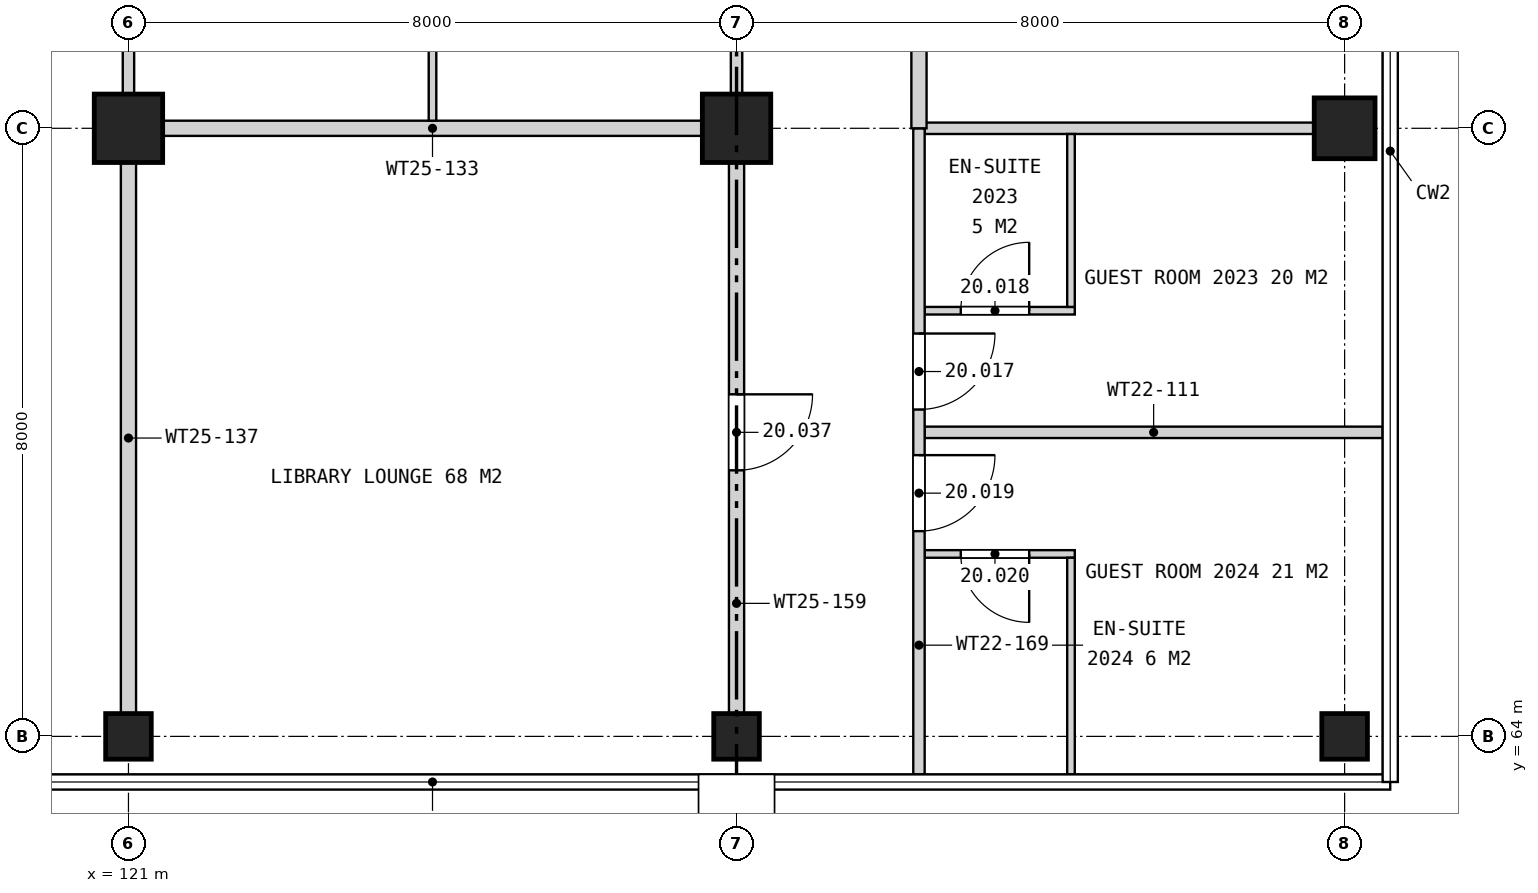
"""IFC4 building model, lengths in metres.
Left out: names, types, materials, properties, quantities, classifications, styles, units other than length and angle.
Written with IfcOpenShell. Run it as: python <this file> out.ifc"""

import sys

from ifc_helpers import new_model, si_unit, direction, frame, frame_2d, origin, origin_2d, place, context, subcontext, project, spatial, rectangle, extrude, element, fill, save


model = new_model("IFC4")
c1 = context("Model", 3, precision=1e-05, world=origin(), true_north=direction((0.0, 1.0)))
c2 = subcontext(c1, "Body", "Model", "MODEL_VIEW")
j1 = project(units=[si_unit("LENGTHUNIT", "METRE"), si_unit("PLANEANGLEUNIT", "RADIAN")], contexts=[c1])
p1 = place(None, origin())
s1 = spatial("IfcSite", under=j1, at=p1, CompositionType="ELEMENT")
p2 = place(p1, origin())
s2 = spatial("IfcBuilding", under=s1, at=p2, CompositionType="ELEMENT")
p3 = place(p2, frame((0.0, 0.0, 101.6)))
s3 = spatial("IfcBuildingStorey", under=s2, at=p3, CompositionType="ELEMENT", Elevation=101.6)
p4 = place(p3, frame((121.0, 64.0, 0.0), z_axis=(0.0, 0.0, 1.0), x_axis=(1.0, 0.0, 0.0)))
e1 = element("IfcColumn", 1, at=p4, inside=s3, PredefinedType="COLUMN", context=c2, shape_type="SweptSolid", body=[
    extrude(rectangle(XDim=0.6, YDim=0.6, at=origin_2d()), origin(), (0.0, 0.0, 1.0), 3.7),
])
p5 = place(p3, frame((121.0, 72.0, 0.0), z_axis=(0.0, 0.0, 1.0), x_axis=(1.0, 0.0, 0.0)))
e2 = element("IfcColumn", 2, at=p5, inside=s3, PredefinedType="COLUMN", context=c2, shape_type="SweptSolid", body=[
    extrude(rectangle(XDim=0.9, YDim=0.9, at=origin_2d()), origin(), (0.0, 0.0, 1.0), 3.7),
])
p6 = place(p3, frame((129.0, 64.0, 0.0), z_axis=(0.0, 0.0, 1.0), x_axis=(1.0, 0.0, 0.0)))
e3 = element("IfcColumn", 3, at=p6, inside=s3, PredefinedType="COLUMN", context=c2, shape_type="SweptSolid", body=[
    extrude(rectangle(XDim=0.6, YDim=0.6, at=origin_2d()), origin(), (0.0, 0.0, 1.0), 3.7),
])
p7 = place(p3, frame((129.0, 72.0, 0.0), z_axis=(0.0, 0.0, 1.0), x_axis=(1.0, 0.0, 0.0)))
e4 = element("IfcColumn", 4, at=p7, inside=s3, PredefinedType="COLUMN", context=c2, shape_type="SweptSolid", body=[
    extrude(rectangle(XDim=0.9, YDim=0.9, at=origin_2d()), origin(), (0.0, 0.0, 1.0), 3.7),
])
p8 = place(p3, frame((137.0, 64.0, 0.0), z_axis=(0.0, 0.0, 1.0), x_axis=(1.0, 0.0, 0.0)))
e5 = element("IfcColumn", 5, at=p8, inside=s3, PredefinedType="COLUMN", context=c2, shape_type="SweptSolid", body=[
    extrude(rectangle(XDim=0.6, YDim=0.6, at=origin_2d()), origin(), (0.0, 0.0, 1.0), 3.7),
])
p9 = place(p3, frame((137.0, 72.0, 0.0), z_axis=(0.0, 0.0, 1.0), x_axis=(1.0, 0.0, 0.0)))
e6 = element("IfcColumn", 6, at=p9, inside=s3, PredefinedType="COLUMN", context=c2, shape_type="SweptSolid", body=[
    extrude(rectangle(XDim=0.8, YDim=0.8, at=origin_2d()), origin(), (0.0, 0.0, 1.0), 3.7),
])
p10 = place(p3, frame((131.475, 66.4, 0.0), z_axis=(0.0, 0.0, 1.0), x_axis=(1.0, 0.0, 0.0)))
e7 = element("IfcWall", 7, at=p10, inside=s3, PredefinedType="PLUMBINGWALL", context=c2, shape_type="SweptSolid", body=[
    extrude(rectangle(XDim=1.975, YDim=0.1, at=frame_2d((0.987, 0.0))), origin(), (0.0, 0.0, 1.0), 3.7),
])
p11 = place(p10, frame((0.475, 0.0, 0.0)))
e8 = element("IfcOpeningElement", 8, at=p11, cuts=e7, PredefinedType="OPENING", context=c2, shape_type="SweptSolid", body=[
    extrude(rectangle(XDim=0.9, YDim=2.1, at=frame_2d((0.45, 1.05))), frame((0.0, 0.06, 0.0), z_axis=(0.0, -1.0, 0.0), x_axis=(1.0, 0.0, 0.0)), (0.0, 0.0, 1.0), 0.12),
])
p12 = place(p3, frame((131.475, 68.0, 0.0), z_axis=(0.0, 0.0, 1.0), x_axis=(1.0, 0.0, 0.0)))
e9 = element("IfcWall", 9, at=p12, inside=s3, PredefinedType="PARTITIONING", context=c2, shape_type="SweptSolid", body=[
    extrude(rectangle(XDim=6.025, YDim=0.15, at=frame_2d((3.012, 0.0))), origin(), (0.0, 0.0, 1.0), 2.843),
])
p13 = place(p3, frame((131.475, 69.6, 0.0), z_axis=(0.0, 0.0, 1.0), x_axis=(1.0, 0.0, 0.0)))
e10 = element("IfcWall", 10, at=p13, inside=s3, PredefinedType="PLUMBINGWALL", context=c2, shape_type="SweptSolid", body=[
    extrude(rectangle(XDim=1.975, YDim=0.1, at=frame_2d((0.987, 0.0))), origin(), (0.0, 0.0, 1.0), 3.7),
])
p14 = place(p13, frame((0.475, 0.0, 0.0)))
e11 = element("IfcOpeningElement", 11, at=p14, cuts=e10, PredefinedType="OPENING", context=c2, shape_type="SweptSolid", body=[
    extrude(rectangle(XDim=0.9, YDim=2.1, at=frame_2d((0.45, 1.05))), frame((0.0, 0.06, 0.0), z_axis=(0.0, -1.0, 0.0), x_axis=(1.0, 0.0, 0.0)), (0.0, 0.0, 1.0), 0.12),
])
p15 = place(p3, frame((121.45, 72.0, 0.0), z_axis=(0.0, 0.0, 1.0), x_axis=(1.0, 0.0, 0.0)))
e12 = element("IfcWall", 12, at=p15, inside=s3, PredefinedType="PARTITIONING", context=c2, shape_type="SweptSolid", body=[
    extrude(rectangle(XDim=7.1, YDim=0.2, at=frame_2d((3.55, 0.0))), origin(), (0.0, 0.0, 1.0), 2.76),
])
p16 = place(p3, frame((131.475, 72.0, 0.0), z_axis=(0.0, 0.0, 1.0), x_axis=(1.0, 0.0, 0.0)))
e13 = element("IfcWall", 13, at=p16, inside=s3, PredefinedType="PARTITIONING", context=c2, shape_type="SweptSolid", body=[
    extrude(rectangle(XDim=5.125, YDim=0.15, at=frame_2d((2.562, 0.0))), origin(), (0.0, 0.0, 1.0), 2.76),
])
p17 = place(p3, frame((121.0, 64.3, 0.0), z_axis=(0.0, 0.0, 1.0), x_axis=(0.0, 1.0, 0.0)))
e14 = element("IfcWall", 14, at=p17, inside=s3, PredefinedType="PARTITIONING", context=c2, shape_type="SweptSolid", body=[
    extrude(rectangle(XDim=7.25, YDim=0.2, at=frame_2d((3.625, 0.0))), origin(), (0.0, 0.0, 1.0), 2.76),
])
p18 = place(p3, frame((121.0, 72.45, 0.0), z_axis=(0.0, 0.0, 1.0), x_axis=(0.0, 1.0, 0.0)))
e15 = element("IfcWall", 15, at=p18, inside=s3, PredefinedType="PARTITIONING", context=c2, shape_type="SweptSolid", body=[
    extrude(rectangle(XDim=7.05, YDim=0.15, at=frame_2d((3.525, 0.0))), origin(), (0.0, 0.0, 1.0), 2.76),
])
p19 = place(p18, frame((1.05, 0.0, 0.0)))
e16 = element("IfcOpeningElement", 16, at=p19, cuts=e15, PredefinedType="OPENING", context=c2, shape_type="SweptSolid", body=[
    extrude(rectangle(XDim=1.0, YDim=2.1, at=frame_2d((0.5, 1.05))), frame((0.0, 0.085, 0.0), z_axis=(0.0, -1.0, 0.0), x_axis=(1.0, 0.0, 0.0)), (0.0, 0.0, 1.0), 0.17),
])
p20 = place(p18, frame((5.05, 0.0, 0.0)))
e17 = element("IfcOpeningElement", 17, at=p20, cuts=e15, PredefinedType="OPENING", context=c2, shape_type="SweptSolid", body=[
    extrude(rectangle(XDim=1.0, YDim=2.1, at=frame_2d((0.5, 1.05))), frame((0.0, 0.085, 0.0), z_axis=(0.0, -1.0, 0.0), x_axis=(1.0, 0.0, 0.0)), (0.0, 0.0, 1.0), 0.17),
])
p21 = place(p3, frame((125.0, 72.1, 0.0), z_axis=(0.0, 0.0, 1.0), x_axis=(0.0, 1.0, 0.0)))
e18 = element("IfcWall", 18, at=p21, inside=s3, PredefinedType="PARTITIONING", context=c2, shape_type="SweptSolid", body=[
    extrude(rectangle(XDim=3.85, YDim=0.1, at=frame_2d((1.925, 0.0))), origin(), (0.0, 0.0, 1.0), 3.7),
])
p22 = place(p3, frame((129.0, 64.3, 0.0), z_axis=(0.0, 0.0, 1.0), x_axis=(0.0, 1.0, 0.0)))
e19 = element("IfcWall", 19, at=p22, inside=s3, PredefinedType="PARTITIONING", context=c2, shape_type="SweptSolid", body=[
    extrude(rectangle(XDim=7.25, YDim=0.2, at=frame_2d((3.625, 0.0))), origin(), (0.0, 0.0, 1.0), 2.76),
])
p23 = place(p22, frame((3.2, 0.0, 0.0)))
e20 = element("IfcOpeningElement", 20, at=p23, cuts=e19, PredefinedType="OPENING", context=c2, shape_type="SweptSolid", body=[
    extrude(rectangle(XDim=1.0, YDim=2.1, at=frame_2d((0.5, 1.05))), frame((0.0, 0.11, 0.0), z_axis=(0.0, -1.0, 0.0), x_axis=(1.0, 0.0, 0.0)), (0.0, 0.0, 1.0), 0.22),
])
p24 = place(p3, frame((129.0, 72.45, 0.0), z_axis=(0.0, 0.0, 1.0), x_axis=(0.0, 1.0, 0.0)))
e21 = element("IfcWall", 21, at=p24, inside=s3, PredefinedType="PARTITIONING", context=c2, shape_type="SweptSolid", body=[
    extrude(rectangle(XDim=7.05, YDim=0.15, at=frame_2d((3.525, 0.0))), origin(), (0.0, 0.0, 1.0), 2.76),
])
p25 = place(p24, frame((1.05, 0.0, 0.0)))
e22 = element("IfcOpeningElement", 22, at=p25, cuts=e21, PredefinedType="OPENING", context=c2, shape_type="SweptSolid", body=[
    extrude(rectangle(XDim=1.0, YDim=2.1, at=frame_2d((0.5, 1.05))), frame((0.0, 0.085, 0.0), z_axis=(0.0, -1.0, 0.0), x_axis=(1.0, 0.0, 0.0)), (0.0, 0.0, 1.0), 0.17),
])
p26 = place(p24, frame((5.05, 0.0, 0.0)))
e23 = element("IfcOpeningElement", 23, at=p26, cuts=e21, PredefinedType="OPENING", context=c2, shape_type="SweptSolid", body=[
    extrude(rectangle(XDim=1.0, YDim=2.1, at=frame_2d((0.5, 1.05))), frame((0.0, 0.085, 0.0), z_axis=(0.0, -1.0, 0.0), x_axis=(1.0, 0.0, 0.0)), (0.0, 0.0, 1.0), 0.17),
])
p27 = place(p3, frame((131.4, 63.5, 0.0), z_axis=(0.0, 0.0, 1.0), x_axis=(0.0, 1.0, 0.0)))
e24 = element("IfcWall", 24, at=p27, inside=s3, PredefinedType="PARTITIONING", context=c2, shape_type="SweptSolid", body=[
    extrude(rectangle(XDim=8.5, YDim=0.15, at=frame_2d((4.25, 0.0))), origin(), (0.0, 0.0, 1.0), 2.76),
])
p28 = place(p27, frame((4.8, 0.0, 0.0)))
e25 = element("IfcOpeningElement", 25, at=p28, cuts=e24, PredefinedType="OPENING", context=c2, shape_type="SweptSolid", body=[
    extrude(rectangle(XDim=1.0, YDim=2.1, at=frame_2d((0.5, 1.05))), frame((0.0, 0.085, 0.0), z_axis=(0.0, -1.0, 0.0), x_axis=(1.0, 0.0, 0.0)), (0.0, 0.0, 1.0), 0.17),
])
p29 = place(p27, frame((3.2, 0.0, 0.0)))
e26 = element("IfcOpeningElement", 26, at=p29, cuts=e24, PredefinedType="OPENING", context=c2, shape_type="SweptSolid", body=[
    extrude(rectangle(XDim=1.0, YDim=2.1, at=frame_2d((0.5, 1.05))), frame((0.0, 0.085, 0.0), z_axis=(0.0, -1.0, 0.0), x_axis=(1.0, 0.0, 0.0)), (0.0, 0.0, 1.0), 0.17),
])
p30 = place(p3, frame((131.4, 72.0, 0.0), z_axis=(0.0, 0.0, 1.0), x_axis=(0.0, 1.0, 0.0)))
e27 = element("IfcWall", 27, at=p30, inside=s3, PredefinedType="PARTITIONING", context=c2, shape_type="SweptSolid", body=[
    extrude(rectangle(XDim=8.0, YDim=0.2, at=frame_2d((4.0, 0.0))), origin(), (0.0, 0.0, 1.0), 2.76),
])
p31 = place(p30, frame((3.5, 0.0, 0.0)))
e28 = element("IfcOpeningElement", 28, at=p31, cuts=e27, PredefinedType="OPENING", context=c2, shape_type="SweptSolid", body=[
    extrude(rectangle(XDim=1.0, YDim=2.1, at=frame_2d((0.5, 1.05))), frame((0.0, 0.11, 0.0), z_axis=(0.0, -1.0, 0.0), x_axis=(1.0, 0.0, 0.0)), (0.0, 0.0, 1.0), 0.22),
])
p32 = place(p3, frame((133.4, 63.5, 0.0), z_axis=(0.0, 0.0, 1.0), x_axis=(0.0, 1.0, 0.0)))
e29 = element("IfcWall", 29, at=p32, inside=s3, PredefinedType="PLUMBINGWALL", context=c2, shape_type="SweptSolid", body=[
    extrude(rectangle(XDim=2.85, YDim=0.1, at=frame_2d((1.425, 0.0))), origin(), (0.0, 0.0, 1.0), 3.7),
])
p33 = place(p3, frame((133.4, 69.65, 0.0), z_axis=(0.0, 0.0, 1.0), x_axis=(0.0, 1.0, 0.0)))
e30 = element("IfcWall", 30, at=p33, inside=s3, PredefinedType="PLUMBINGWALL", context=c2, shape_type="SweptSolid", body=[
    extrude(rectangle(XDim=2.275, YDim=0.1, at=frame_2d((1.138, 0.0))), origin(), (0.0, 0.0, 1.0), 3.7),
])
p34 = place(p28, frame((1.0, 0.0, 0.0), z_axis=(0.0, 0.0, 1.0), x_axis=(-1.0, 0.0, 0.0)))
e31 = element("IfcDoor", 31, at=p34, inside=s3, OperationType="SINGLE_SWING_LEFT", PredefinedType="DOOR", context=c2, shape_type="SweptSolid", body=[
    extrude(rectangle(XDim=1.0, YDim=2.1, at=frame_2d((0.5, 1.05))), frame((0.0, 0.025, 0.0), z_axis=(0.0, -1.0, 0.0), x_axis=(1.0, 0.0, 0.0)), (0.0, 0.0, 1.0), 0.05),
])
fill(e25, e31)
p35 = place(p14, origin())
e32 = element("IfcDoor", 32, at=p35, inside=s3, OperationType="SINGLE_SWING_RIGHT", PredefinedType="DOOR", context=c2, shape_type="SweptSolid", body=[
    extrude(rectangle(XDim=0.9, YDim=2.1, at=frame_2d((0.45, 1.05))), frame((0.0, 0.025, 0.0), z_axis=(0.0, -1.0, 0.0), x_axis=(1.0, 0.0, 0.0)), (0.0, 0.0, 1.0), 0.05),
])
fill(e11, e32)
p36 = place(p29, frame((1.0, 0.0, 0.0), z_axis=(0.0, 0.0, 1.0), x_axis=(-1.0, 0.0, 0.0)))
e33 = element("IfcDoor", 33, at=p36, inside=s3, OperationType="SINGLE_SWING_LEFT", PredefinedType="DOOR", context=c2, shape_type="SweptSolid", body=[
    extrude(rectangle(XDim=1.0, YDim=2.1, at=frame_2d((0.5, 1.05))), frame((0.0, 0.025, 0.0), z_axis=(0.0, -1.0, 0.0), x_axis=(1.0, 0.0, 0.0)), (0.0, 0.0, 1.0), 0.05),
])
fill(e26, e33)
p37 = place(p11, frame((0.9, 0.0, 0.0), z_axis=(0.0, 0.0, 1.0), x_axis=(-1.0, 0.0, 0.0)))
e34 = element("IfcDoor", 34, at=p37, inside=s3, OperationType="SINGLE_SWING_LEFT", PredefinedType="DOOR", context=c2, shape_type="SweptSolid", body=[
    extrude(rectangle(XDim=0.9, YDim=2.1, at=frame_2d((0.45, 1.05))), frame((0.0, 0.025, 0.0), z_axis=(0.0, -1.0, 0.0), x_axis=(1.0, 0.0, 0.0)), (0.0, 0.0, 1.0), 0.05),
])
fill(e8, e34)
p38 = place(p23, frame((1.0, 0.0, 0.0), z_axis=(0.0, 0.0, 1.0), x_axis=(-1.0, 0.0, 0.0)))
e35 = element("IfcDoor", 35, at=p38, inside=s3, OperationType="SINGLE_SWING_LEFT", PredefinedType="DOOR", context=c2, shape_type="SweptSolid", body=[
    extrude(rectangle(XDim=1.0, YDim=2.1, at=frame_2d((0.5, 1.05))), frame((0.0, 0.025, 0.0), z_axis=(0.0, -1.0, 0.0), x_axis=(1.0, 0.0, 0.0)), (0.0, 0.0, 1.0), 0.05),
])
fill(e20, e35)
save(model, sys.argv[1])
